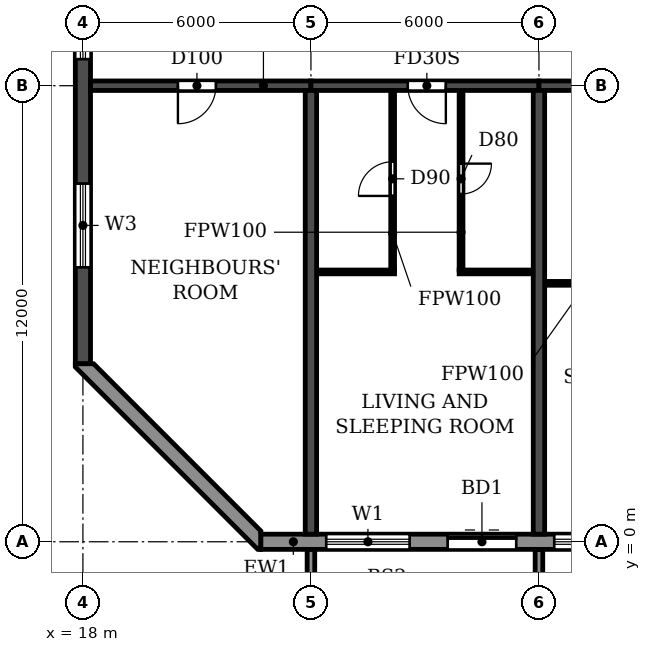
"""IFC4 building model, lengths in metres.
Left out: names, types, materials, properties, quantities, classifications, styles, units other than length and angle.
Written with IfcOpenShell. Run it as: python <this file> out.ifc"""

import sys

from ifc_helpers import new_model, si_unit, direction, frame, frame_2d, origin, place, context, subcontext, project, spatial, polyline, rectangle, outline, extrude, source, transform, mapped, element, fill, save


model = new_model("IFC4")
c1 = context("Model", 3, precision=1e-05, world=origin(), true_north=direction((0.0, 1.0)))
c2 = subcontext(c1, "Body", "Model", "MODEL_VIEW")
j1 = project(units=[si_unit("LENGTHUNIT", "METRE"), si_unit("PLANEANGLEUNIT", "RADIAN")], contexts=[c1])
p1 = place(None, origin())
s1 = spatial("IfcSite", under=j1, at=p1, CompositionType="ELEMENT")
p2 = place(p1, origin())
s2 = spatial("IfcBuilding", under=s1, at=p2, CompositionType="ELEMENT")
p3 = place(p2, frame((0.0, 0.0, 162.0)))
s3 = spatial("IfcBuildingStorey", under=s2, at=p3, CompositionType="ELEMENT", Elevation=162.0)
for number, where, z_axis, x_axis in (
    (1, (24.0, 0.2, 0.0), (0.0, 0.0, 1.0), (0.0, 1.0, 0.0)),
    (2, (30.0, 0.2, 0.0), (0.0, 0.0, 1.0), (0.0, 1.0, 0.0)),
):
    element("IfcWall", number, at=place(p3, frame(where, z_axis=z_axis, x_axis=x_axis)), inside=s3, PredefinedType="SHEAR", context=c2, shape_type="SweptSolid", body=[
        extrude(rectangle(XDim=11.675, YDim=0.3, at=frame_2d((5.837, 0.0))), origin(), (0.0, 0.0, 1.0), 2.95),
    ])
p4 = place(p3, frame((18.0, 4.683, 0.0), z_axis=(0.0, 0.0, 1.0), x_axis=(0.0, 1.0, 0.0)))
e3 = element("IfcWall", 3, at=p4, inside=s3, PredefinedType="SHEAR", context=c2, shape_type="SweptSolid", body=[
    extrude(rectangle(XDim=33.034, YDim=0.4, at=frame_2d((16.517, 0.0))), origin(), (0.0, 0.0, 1.0), 2.95),
])
p5 = place(p4, frame((23.817, 0.0, 0.9)))
e4 = element("IfcOpeningElement", 4, at=p5, cuts=e3, PredefinedType="OPENING", context=c2, shape_type="SweptSolid", body=[
    extrude(rectangle(XDim=1.2, YDim=1.5, at=frame_2d((0.6, 0.75))), frame((0.0, 0.21, 0.0), z_axis=(0.0, -1.0, 0.0), x_axis=(1.0, 0.0, 0.0)), (0.0, 0.0, 1.0), 0.42),
])
p6 = place(p4, frame((8.017, 0.0, 0.9)))
e5 = element("IfcOpeningElement", 5, at=p6, cuts=e3, PredefinedType="OPENING", context=c2, shape_type="SweptSolid", body=[
    extrude(rectangle(XDim=1.2, YDim=1.5, at=frame_2d((0.6, 0.75))), frame((0.0, 0.21, 0.0), z_axis=(0.0, -1.0, 0.0), x_axis=(1.0, 0.0, 0.0)), (0.0, 0.0, 1.0), 0.42),
])
p7 = place(p4, frame((28.293, 0.0, 0.6)))
e6 = element("IfcOpeningElement", 6, at=p7, cuts=e3, PredefinedType="OPENING", context=c2, shape_type="SweptSolid", body=[
    extrude(rectangle(XDim=2.2, YDim=1.8, at=frame_2d((1.1, 0.9))), frame((0.0, 0.21, 0.0), z_axis=(0.0, -1.0, 0.0), x_axis=(1.0, 0.0, 0.0)), (0.0, 0.0, 1.0), 0.42),
])
p8 = place(p4, frame((2.541, 0.0, 0.6)))
e7 = element("IfcOpeningElement", 7, at=p8, cuts=e3, PredefinedType="OPENING", context=c2, shape_type="SweptSolid", body=[
    extrude(rectangle(XDim=2.2, YDim=1.8, at=frame_2d((1.1, 0.9))), frame((0.0, 0.21, 0.0), z_axis=(0.0, -1.0, 0.0), x_axis=(1.0, 0.0, 0.0)), (0.0, 0.0, 1.0), 0.42),
])
p9 = place(p4, frame((15.917, 0.0, 0.9)))
e8 = element("IfcOpeningElement", 8, at=p9, cuts=e3, PredefinedType="OPENING", context=c2, shape_type="SweptSolid", body=[
    extrude(rectangle(XDim=1.2, YDim=1.5, at=frame_2d((0.6, 0.75))), frame((0.0, 0.21, 0.0), z_axis=(0.0, -1.0, 0.0), x_axis=(1.0, 0.0, 0.0)), (0.0, 0.0, 1.0), 0.42),
])
p10 = place(p3, frame((18.2, 12.0, 0.0), z_axis=(0.0, 0.0, 1.0), x_axis=(1.0, 0.0, 0.0)))
e9 = element("IfcWall", 9, at=p10, inside=s3, PredefinedType="SHEAR", context=c2, shape_type="SweptSolid", body=[
    extrude(rectangle(XDim=5.8, YDim=0.25, at=frame_2d((2.9, 0.0))), origin(), (0.0, 0.0, 1.0), 2.35),
])
p11 = place(p10, frame((2.3, 0.0, 0.0)))
e10 = element("IfcOpeningElement", 10, at=p11, cuts=e9, PredefinedType="OPENING", context=c2, shape_type="SweptSolid", body=[
    extrude(rectangle(XDim=1.0, YDim=2.1, at=frame_2d((0.5, 1.05))), frame((0.0, 0.135, 0.0), z_axis=(0.0, -1.0, 0.0), x_axis=(1.0, 0.0, 0.0)), (0.0, 0.0, 1.0), 0.27),
])
p12 = place(p3, frame((24.0, 12.0, 0.0), z_axis=(0.0, 0.0, 1.0), x_axis=(1.0, 0.0, 0.0)))
e11 = element("IfcWall", 11, at=p12, inside=s3, PredefinedType="SHEAR", context=c2, shape_type="SweptSolid", body=[
    extrude(rectangle(XDim=6.0, YDim=0.25, at=frame_2d((3.0, 0.0))), origin(), (0.0, 0.0, 1.0), 2.35),
])
p13 = place(p12, frame((2.55, 0.0, 0.0)))
e12 = element("IfcOpeningElement", 12, at=p13, cuts=e11, PredefinedType="OPENING", context=c2, shape_type="SweptSolid", body=[
    extrude(rectangle(XDim=1.0, YDim=2.1, at=frame_2d((0.5, 1.05))), frame((0.0, 0.135, 0.0), z_axis=(0.0, -1.0, 0.0), x_axis=(1.0, 0.0, 0.0)), (0.0, 0.0, 1.0), 0.27),
])
p14 = place(p3, frame((30.0, 12.0, 0.0), z_axis=(0.0, 0.0, 1.0), x_axis=(1.0, 0.0, 0.0)))
e13 = element("IfcWall", 13, at=p14, inside=s3, PredefinedType="SHEAR", context=c2, shape_type="SweptSolid", body=[
    extrude(rectangle(XDim=6.0, YDim=0.25, at=frame_2d((3.0, 0.0))), origin(), (0.0, 0.0, 1.0), 2.35),
])
p15 = place(p14, frame((2.45, 0.0, 0.0)))
e14 = element("IfcOpeningElement", 14, at=p15, cuts=e13, PredefinedType="OPENING", context=c2, shape_type="SweptSolid", body=[
    extrude(rectangle(XDim=1.0, YDim=2.1, at=frame_2d((0.5, 1.05))), frame((0.0, 0.135, 0.0), z_axis=(0.0, -1.0, 0.0), x_axis=(1.0, 0.0, 0.0)), (0.0, 0.0, 1.0), 0.27),
])
p16 = place(p3, frame((22.683, 0.0, 0.0), z_axis=(0.0, 0.0, 1.0), x_axis=(1.0, 0.0, 0.0)))
e15 = element("IfcWall", 15, at=p16, inside=s3, PredefinedType="STANDARD", context=c2, shape_type="SweptSolid", body=[
    extrude(rectangle(XDim=56.634, YDim=0.4, at=frame_2d((28.317, 0.0))), origin(), (0.0, 0.0, 1.0), 2.95),
])
p17 = place(p16, frame((1.717, 0.0, 0.9)))
e16 = element("IfcOpeningElement", 16, at=p17, cuts=e15, PredefinedType="OPENING", context=c2, shape_type="SweptSolid", body=[
    extrude(rectangle(XDim=2.2, YDim=1.5, at=frame_2d((1.1, 0.75))), frame((0.0, 0.21, 0.0), z_axis=(0.0, -1.0, 0.0), x_axis=(1.0, 0.0, 0.0)), (0.0, 0.0, 1.0), 0.42),
])
p18 = place(p16, frame((4.917, 0.0, 0.0)))
e17 = element("IfcOpeningElement", 17, at=p18, cuts=e15, PredefinedType="OPENING", context=c2, shape_type="SweptSolid", body=[
    extrude(rectangle(XDim=1.8, YDim=2.4, at=frame_2d((0.9, 1.2))), frame((0.0, 0.21, 0.0), z_axis=(0.0, -1.0, 0.0), x_axis=(1.0, 0.0, 0.0)), (0.0, 0.0, 1.0), 0.42),
])
p19 = place(p16, frame((7.717, 0.0, 0.9)))
e18 = element("IfcOpeningElement", 18, at=p19, cuts=e15, PredefinedType="OPENING", context=c2, shape_type="SweptSolid", body=[
    extrude(rectangle(XDim=2.2, YDim=1.5, at=frame_2d((1.1, 0.75))), frame((0.0, 0.21, 0.0), z_axis=(0.0, -1.0, 0.0), x_axis=(1.0, 0.0, 0.0)), (0.0, 0.0, 1.0), 0.42),
])
p20 = place(p16, frame((10.717, 0.0, 0.9)))
e19 = element("IfcOpeningElement", 19, at=p20, cuts=e15, PredefinedType="OPENING", context=c2, shape_type="SweptSolid", body=[
    extrude(rectangle(XDim=2.2, YDim=1.5, at=frame_2d((1.1, 0.75))), frame((0.0, 0.21, 0.0), z_axis=(0.0, -1.0, 0.0), x_axis=(1.0, 0.0, 0.0)), (0.0, 0.0, 1.0), 0.42),
])
p21 = place(p16, frame((13.717, 0.0, 0.9)))
e20 = element("IfcOpeningElement", 20, at=p21, cuts=e15, PredefinedType="OPENING", context=c2, shape_type="SweptSolid", body=[
    extrude(rectangle(XDim=2.2, YDim=1.5, at=frame_2d((1.1, 0.75))), frame((0.0, 0.21, 0.0), z_axis=(0.0, -1.0, 0.0), x_axis=(1.0, 0.0, 0.0)), (0.0, 0.0, 1.0), 0.42),
])
p22 = place(p16, frame((16.917, 0.0, 0.0)))
e21 = element("IfcOpeningElement", 21, at=p22, cuts=e15, PredefinedType="OPENING", context=c2, shape_type="SweptSolid", body=[
    extrude(rectangle(XDim=1.8, YDim=2.4, at=frame_2d((0.9, 1.2))), frame((0.0, 0.21, 0.0), z_axis=(0.0, -1.0, 0.0), x_axis=(1.0, 0.0, 0.0)), (0.0, 0.0, 1.0), 0.42),
])
p23 = place(p16, frame((19.717, 0.0, 0.9)))
e22 = element("IfcOpeningElement", 22, at=p23, cuts=e15, PredefinedType="OPENING", context=c2, shape_type="SweptSolid", body=[
    extrude(rectangle(XDim=2.2, YDim=1.5, at=frame_2d((1.1, 0.75))), frame((0.0, 0.21, 0.0), z_axis=(0.0, -1.0, 0.0), x_axis=(1.0, 0.0, 0.0)), (0.0, 0.0, 1.0), 0.42),
])
p24 = place(p16, frame((22.717, 0.0, 0.9)))
e23 = element("IfcOpeningElement", 23, at=p24, cuts=e15, PredefinedType="OPENING", context=c2, shape_type="SweptSolid", body=[
    extrude(rectangle(XDim=2.2, YDim=1.5, at=frame_2d((1.1, 0.75))), frame((0.0, 0.21, 0.0), z_axis=(0.0, -1.0, 0.0), x_axis=(1.0, 0.0, 0.0)), (0.0, 0.0, 1.0), 0.42),
])
p25 = place(p16, frame((25.717, 0.0, 0.9)))
e24 = element("IfcOpeningElement", 24, at=p25, cuts=e15, PredefinedType="OPENING", context=c2, shape_type="SweptSolid", body=[
    extrude(rectangle(XDim=2.2, YDim=1.5, at=frame_2d((1.1, 0.75))), frame((0.0, 0.21, 0.0), z_axis=(0.0, -1.0, 0.0), x_axis=(1.0, 0.0, 0.0)), (0.0, 0.0, 1.0), 0.42),
])
p26 = place(p16, frame((28.717, 0.0, 0.9)))
e25 = element("IfcOpeningElement", 25, at=p26, cuts=e15, PredefinedType="OPENING", context=c2, shape_type="SweptSolid", body=[
    extrude(rectangle(XDim=2.2, YDim=1.5, at=frame_2d((1.1, 0.75))), frame((0.0, 0.21, 0.0), z_axis=(0.0, -1.0, 0.0), x_axis=(1.0, 0.0, 0.0)), (0.0, 0.0, 1.0), 0.42),
])
p27 = place(p16, frame((31.717, 0.0, 0.9)))
e26 = element("IfcOpeningElement", 26, at=p27, cuts=e15, PredefinedType="OPENING", context=c2, shape_type="SweptSolid", body=[
    extrude(rectangle(XDim=2.2, YDim=1.5, at=frame_2d((1.1, 0.75))), frame((0.0, 0.21, 0.0), z_axis=(0.0, -1.0, 0.0), x_axis=(1.0, 0.0, 0.0)), (0.0, 0.0, 1.0), 0.42),
])
p28 = place(p16, frame((34.717, 0.0, 0.9)))
e27 = element("IfcOpeningElement", 27, at=p28, cuts=e15, PredefinedType="OPENING", context=c2, shape_type="SweptSolid", body=[
    extrude(rectangle(XDim=2.2, YDim=1.5, at=frame_2d((1.1, 0.75))), frame((0.0, 0.21, 0.0), z_axis=(0.0, -1.0, 0.0), x_axis=(1.0, 0.0, 0.0)), (0.0, 0.0, 1.0), 0.42),
])
p29 = place(p16, frame((37.717, 0.0, 0.9)))
e28 = element("IfcOpeningElement", 28, at=p29, cuts=e15, PredefinedType="OPENING", context=c2, shape_type="SweptSolid", body=[
    extrude(rectangle(XDim=2.2, YDim=1.5, at=frame_2d((1.1, 0.75))), frame((0.0, 0.21, 0.0), z_axis=(0.0, -1.0, 0.0), x_axis=(1.0, 0.0, 0.0)), (0.0, 0.0, 1.0), 0.42),
])
p30 = place(p16, frame((40.717, 0.0, 0.9)))
e29 = element("IfcOpeningElement", 29, at=p30, cuts=e15, PredefinedType="OPENING", context=c2, shape_type="SweptSolid", body=[
    extrude(rectangle(XDim=2.2, YDim=1.5, at=frame_2d((1.1, 0.75))), frame((0.0, 0.21, 0.0), z_axis=(0.0, -1.0, 0.0), x_axis=(1.0, 0.0, 0.0)), (0.0, 0.0, 1.0), 0.42),
])
p31 = place(p16, frame((43.717, 0.0, 0.9)))
e30 = element("IfcOpeningElement", 30, at=p31, cuts=e15, PredefinedType="OPENING", context=c2, shape_type="SweptSolid", body=[
    extrude(rectangle(XDim=2.2, YDim=1.5, at=frame_2d((1.1, 0.75))), frame((0.0, 0.21, 0.0), z_axis=(0.0, -1.0, 0.0), x_axis=(1.0, 0.0, 0.0)), (0.0, 0.0, 1.0), 0.42),
])
p32 = place(p16, frame((46.717, 0.0, 0.9)))
e31 = element("IfcOpeningElement", 31, at=p32, cuts=e15, PredefinedType="OPENING", context=c2, shape_type="SweptSolid", body=[
    extrude(rectangle(XDim=2.2, YDim=1.5, at=frame_2d((1.1, 0.75))), frame((0.0, 0.21, 0.0), z_axis=(0.0, -1.0, 0.0), x_axis=(1.0, 0.0, 0.0)), (0.0, 0.0, 1.0), 0.42),
])
p33 = place(p16, frame((49.917, 0.0, 0.0)))
e32 = element("IfcOpeningElement", 32, at=p33, cuts=e15, PredefinedType="OPENING", context=c2, shape_type="SweptSolid", body=[
    extrude(rectangle(XDim=1.8, YDim=2.4, at=frame_2d((0.9, 1.2))), frame((0.0, 0.21, 0.0), z_axis=(0.0, -1.0, 0.0), x_axis=(1.0, 0.0, 0.0)), (0.0, 0.0, 1.0), 0.42),
])
p34 = place(p16, frame((52.717, 0.0, 0.9)))
e33 = element("IfcOpeningElement", 33, at=p34, cuts=e15, PredefinedType="OPENING", context=c2, shape_type="SweptSolid", body=[
    extrude(rectangle(XDim=2.2, YDim=1.5, at=frame_2d((1.1, 0.75))), frame((0.0, 0.21, 0.0), z_axis=(0.0, -1.0, 0.0), x_axis=(1.0, 0.0, 0.0)), (0.0, 0.0, 1.0), 0.42),
])
p35 = place(p3, origin())
e34 = element("IfcWall", 34, at=p35, inside=s3, PredefinedType="STANDARD", context=c2, shape_type="SweptSolid", body=[
    extrude(outline(polyline([(17.8, 4.683), (17.8, 4.6), (22.6, -0.2), (22.683, -0.2), (22.683, 0.283), (18.283, 4.683), (17.8, 4.683)])), origin(), (0.0, 0.0, 1.0), 2.95),
])
m1 = source(origin(), c2, "Body", "SweptSolid", [
    extrude(outline(polyline([(0.0, 0.0), (0.2, 0.0), (0.2, 1.65), (0.0, 1.65), (0.0, 0.0)])), origin(), (0.0, 0.0, 1.0), 3.1),
])
for number, where in (
    (35, (23.9, -1.85, 0.0)),
    (36, (29.9, -1.85, 0.0)),
):
    element("IfcWall", number, at=place(p3, frame(where)), inside=s3, PredefinedType="STANDARD", context=c2, shape_type="MappedRepresentation", body=[
        mapped(m1, transform((0.0, 0.0, 0.0))),
    ])
p36 = place(p3, frame((30.16, 6.8, 0.0), z_axis=(0.0, 0.0, 1.0), x_axis=(1.0, 0.0, 0.0)))
e37 = element("IfcWall", 37, at=p36, inside=s3, PredefinedType="PARTITIONING", context=c2, shape_type="SweptSolid", body=[
    extrude(rectangle(XDim=1.94, YDim=0.1, at=frame_2d((0.97, 0.0))), origin(), (0.0, 0.0, 1.0), 2.95),
])
p37 = place(p3, frame((24.16, 7.1, 0.0), z_axis=(0.0, 0.0, 1.0), x_axis=(1.0, 0.0, 0.0)))
e38 = element("IfcWall", 38, at=p37, inside=s3, PredefinedType="PARTITIONING", context=c2, shape_type="SweptSolid", body=[
    extrude(rectangle(XDim=2.04, YDim=0.1, at=frame_2d((1.02, 0.0))), origin(), (0.0, 0.0, 1.0), 2.95),
])
p38 = place(p3, frame((27.9, 7.1, 0.0), z_axis=(0.0, 0.0, 1.0), x_axis=(1.0, 0.0, 0.0)))
e39 = element("IfcWall", 39, at=p38, inside=s3, PredefinedType="PARTITIONING", context=c2, shape_type="SweptSolid", body=[
    extrude(rectangle(XDim=1.94, YDim=0.1, at=frame_2d((0.97, 0.0))), origin(), (0.0, 0.0, 1.0), 2.95),
])
p39 = place(p3, frame((26.15, 7.15, 0.0), z_axis=(0.0, 0.0, 1.0), x_axis=(0.0, 1.0, 0.0)))
e40 = element("IfcWall", 40, at=p39, inside=s3, PredefinedType="PARTITIONING", context=c2, shape_type="SweptSolid", body=[
    extrude(rectangle(XDim=4.715, YDim=0.1, at=frame_2d((2.357, 0.0))), origin(), (0.0, 0.0, 1.0), 2.95),
])
p40 = place(p39, frame((1.95, 0.0, 0.0)))
e41 = element("IfcOpeningElement", 41, at=p40, cuts=e40, PredefinedType="OPENING", context=c2, shape_type="SweptSolid", body=[
    extrude(rectangle(XDim=0.9, YDim=2.1, at=frame_2d((0.45, 1.05))), frame((0.0, 0.06, 0.0), z_axis=(0.0, -1.0, 0.0), x_axis=(1.0, 0.0, 0.0)), (0.0, 0.0, 1.0), 0.12),
])
p41 = place(p3, frame((27.95, 7.15, 0.0), z_axis=(0.0, 0.0, 1.0), x_axis=(0.0, 1.0, 0.0)))
e42 = element("IfcWall", 42, at=p41, inside=s3, PredefinedType="PARTITIONING", context=c2, shape_type="SweptSolid", body=[
    extrude(rectangle(XDim=4.715, YDim=0.1, at=frame_2d((2.357, 0.0))), origin(), (0.0, 0.0, 1.0), 2.95),
])
p42 = place(p41, frame((2.0, 0.0, 0.0)))
e43 = element("IfcOpeningElement", 43, at=p42, cuts=e42, PredefinedType="OPENING", context=c2, shape_type="SweptSolid", body=[
    extrude(rectangle(XDim=0.8, YDim=2.1, at=frame_2d((0.4, 1.05))), frame((0.0, 0.06, 0.0), z_axis=(0.0, -1.0, 0.0), x_axis=(1.0, 0.0, 0.0)), (0.0, 0.0, 1.0), 0.12),
])
p43 = place(p17, origin())
e44 = element("IfcWindow", 44, at=p43, inside=s3, PartitioningType="DOUBLE_PANEL_HORIZONTAL", PredefinedType="WINDOW", context=c2, shape_type="SweptSolid", body=[
    extrude(rectangle(XDim=2.2, YDim=1.5, at=frame_2d((1.1, 0.75))), frame((0.0, 0.03, 0.0), z_axis=(0.0, -1.0, 0.0), x_axis=(1.0, 0.0, 0.0)), (0.0, 0.0, 1.0), 0.06),
])
fill(e16, e44)
p44 = place(p18, origin())
e45 = element("IfcDoor", 45, at=p44, inside=s3, OperationType="DOUBLE_DOOR_SLIDING", PredefinedType="DOOR", context=c2, shape_type="SweptSolid", body=[
    extrude(rectangle(XDim=1.8, YDim=2.4, at=frame_2d((0.9, 1.2))), frame((0.0, 0.025, 0.0), z_axis=(0.0, -1.0, 0.0), x_axis=(1.0, 0.0, 0.0)), (0.0, 0.0, 1.0), 0.05),
])
fill(e17, e45)
p45 = place(p19, origin())
e46 = element("IfcWindow", 46, at=p45, inside=s3, PartitioningType="DOUBLE_PANEL_HORIZONTAL", PredefinedType="WINDOW", context=c2, shape_type="SweptSolid", body=[
    extrude(rectangle(XDim=2.2, YDim=1.5, at=frame_2d((1.1, 0.75))), frame((0.0, 0.03, 0.0), z_axis=(0.0, -1.0, 0.0), x_axis=(1.0, 0.0, 0.0)), (0.0, 0.0, 1.0), 0.06),
])
fill(e18, e46)
p46 = place(p6, origin())
e47 = element("IfcWindow", 47, at=p46, inside=s3, PartitioningType="SINGLE_PANEL", PredefinedType="WINDOW", context=c2, shape_type="SweptSolid", body=[
    extrude(rectangle(XDim=1.2, YDim=1.5, at=frame_2d((0.6, 0.75))), frame((0.0, 0.03, 0.0), z_axis=(0.0, -1.0, 0.0), x_axis=(1.0, 0.0, 0.0)), (0.0, 0.0, 1.0), 0.06),
])
fill(e5, e47)
p47 = place(p8, origin())
e48 = element("IfcWindow", 48, at=p47, inside=s3, PartitioningType="DOUBLE_PANEL_HORIZONTAL", PredefinedType="WINDOW", context=c2, shape_type="SweptSolid", body=[
    extrude(rectangle(XDim=2.2, YDim=1.8, at=frame_2d((1.1, 0.9))), frame((0.0, 0.03, 0.0), z_axis=(0.0, -1.0, 0.0), x_axis=(1.0, 0.0, 0.0)), (0.0, 0.0, 1.0), 0.06),
])
fill(e7, e48)
p48 = place(p11, frame((1.0, 0.0, 0.0), z_axis=(0.0, 0.0, 1.0), x_axis=(-1.0, 0.0, 0.0)))
e49 = element("IfcDoor", 49, at=p48, inside=s3, OperationType="SINGLE_SWING_RIGHT", PredefinedType="DOOR", context=c2, shape_type="SweptSolid", body=[
    extrude(rectangle(XDim=1.0, YDim=2.1, at=frame_2d((0.5, 1.05))), frame((0.0, 0.025, 0.0), z_axis=(0.0, -1.0, 0.0), x_axis=(1.0, 0.0, 0.0)), (0.0, 0.0, 1.0), 0.05),
])
fill(e10, e49)
p49 = place(p40, origin())
e50 = element("IfcDoor", 50, at=p49, inside=s3, OperationType="SINGLE_SWING_LEFT", PredefinedType="DOOR", context=c2, shape_type="SweptSolid", body=[
    extrude(rectangle(XDim=0.9, YDim=2.1, at=frame_2d((0.45, 1.05))), frame((0.0, 0.025, 0.0), z_axis=(0.0, -1.0, 0.0), x_axis=(1.0, 0.0, 0.0)), (0.0, 0.0, 1.0), 0.05),
])
fill(e41, e50)
p50 = place(p13, frame((1.0, 0.0, 0.0), z_axis=(0.0, 0.0, 1.0), x_axis=(-1.0, 0.0, 0.0)))
e51 = element("IfcDoor", 51, at=p50, inside=s3, OperationType="SINGLE_SWING_LEFT", PredefinedType="DOOR", context=c2, shape_type="SweptSolid", body=[
    extrude(rectangle(XDim=1.0, YDim=2.1, at=frame_2d((0.5, 1.05))), frame((0.0, 0.025, 0.0), z_axis=(0.0, -1.0, 0.0), x_axis=(1.0, 0.0, 0.0)), (0.0, 0.0, 1.0), 0.05),
])
fill(e12, e51)
p51 = place(p42, frame((0.8, 0.0, 0.0), z_axis=(0.0, 0.0, 1.0), x_axis=(-1.0, 0.0, 0.0)))
e52 = element("IfcDoor", 52, at=p51, inside=s3, OperationType="SINGLE_SWING_LEFT", PredefinedType="DOOR", context=c2, shape_type="SweptSolid", body=[
    extrude(rectangle(XDim=0.8, YDim=2.1, at=frame_2d((0.4, 1.05))), frame((0.0, 0.025, 0.0), z_axis=(0.0, -1.0, 0.0), x_axis=(1.0, 0.0, 0.0)), (0.0, 0.0, 1.0), 0.05),
])
fill(e43, e52)
save(model, sys.argv[1])
